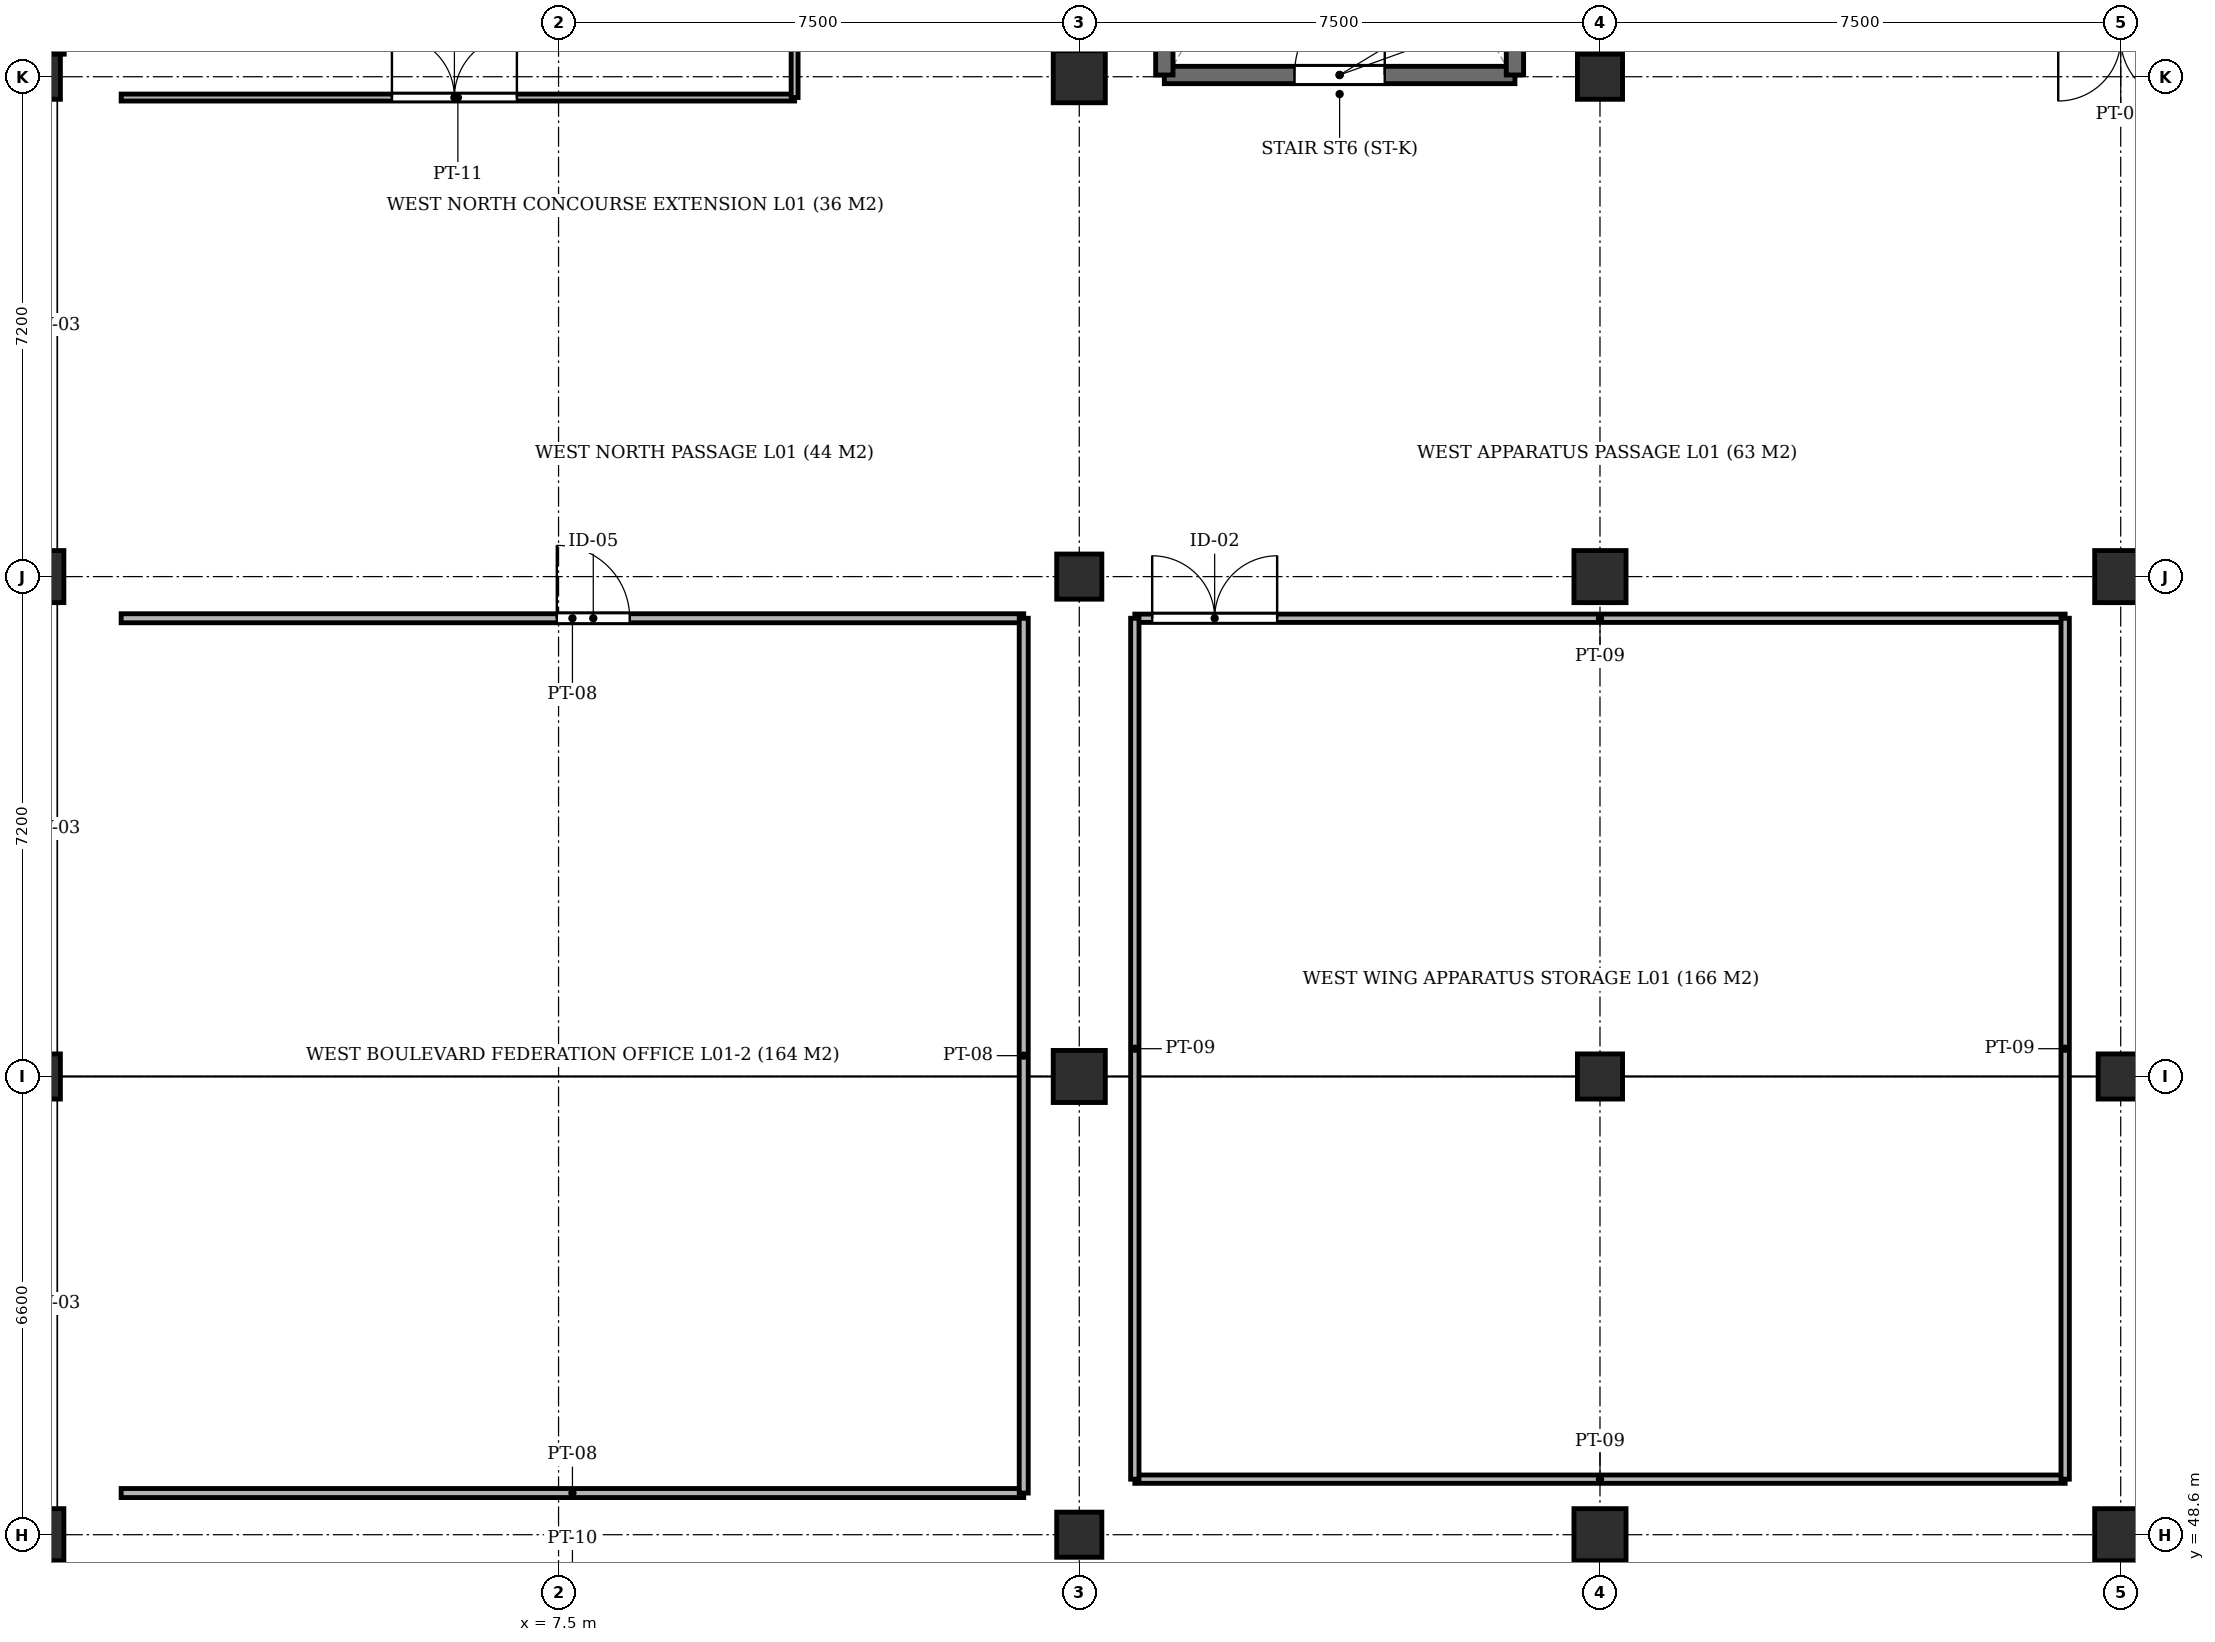
"""IFC4 building model, lengths in metres.
Left out: names, types, materials, properties, quantities, classifications, styles, units other than length and angle.
Written with IfcOpenShell. Run it as: python <this file> out.ifc"""

import sys

from ifc_helpers import new_model, si_unit, direction, frame, frame_2d, origin, origin_2d, place, context, subcontext, project, spatial, rectangle, extrude, element, fill, save


model = new_model("IFC4")
c1 = context("Model", 3, precision=1e-05, world=origin(), true_north=direction((0.0, 1.0)))
c2 = subcontext(c1, "Body", "Model", "MODEL_VIEW")
j1 = project(units=[si_unit("LENGTHUNIT", "METRE"), si_unit("PLANEANGLEUNIT", "RADIAN")], contexts=[c1])
p1 = place(None, origin())
s1 = spatial("IfcSite", under=j1, at=p1, CompositionType="ELEMENT")
p2 = place(p1, origin())
s2 = spatial("IfcBuilding", under=s1, at=p2, CompositionType="ELEMENT")
p3 = place(p2, frame((0.0, 0.0, 4.6)))
s3 = spatial("IfcBuildingStorey", under=s2, at=p3, CompositionType="ELEMENT", Elevation=4.6)
p4 = place(p3, frame((0.0, 48.6, -0.3), z_axis=(0.0, 0.0, 1.0), x_axis=(1.0, 0.0, 0.0)))
e1 = element("IfcColumn", 1, at=p4, inside=s3, PredefinedType="COLUMN", context=c2, shape_type="SweptSolid", body=[
    extrude(rectangle(XDim=0.75, YDim=0.75, at=origin_2d()), origin(), (0.0, 0.0, 1.0), 4.65),
])
p5 = place(p3, frame((0.0, 55.2, -0.3), z_axis=(0.0, 0.0, 1.0), x_axis=(1.0, 0.0, 0.0)))
e2 = element("IfcColumn", 2, at=p5, inside=s3, PredefinedType="COLUMN", context=c2, shape_type="SweptSolid", body=[
    extrude(rectangle(XDim=0.65, YDim=0.65, at=origin_2d()), origin(), (0.0, 0.0, 1.0), 4.65),
])
p6 = place(p3, frame((0.0, 62.4, -0.3), z_axis=(0.0, 0.0, 1.0), x_axis=(1.0, 0.0, 0.0)))
e3 = element("IfcColumn", 3, at=p6, inside=s3, PredefinedType="COLUMN", context=c2, shape_type="SweptSolid", body=[
    extrude(rectangle(XDim=0.75, YDim=0.75, at=origin_2d()), origin(), (0.0, 0.0, 1.0), 4.65),
])
for number, where, z_axis, x_axis in (
    (4, (0.0, 69.6, -0.3), (0.0, 0.0, 1.0), (1.0, 0.0, 0.0)),
    (5, (15.0, 48.6, -0.3), (0.0, 0.0, 1.0), (1.0, 0.0, 0.0)),
):
    element("IfcColumn", number, at=place(p3, frame(where, z_axis=z_axis, x_axis=x_axis)), inside=s3, PredefinedType="COLUMN", context=c2, shape_type="SweptSolid", body=[
        extrude(rectangle(XDim=0.65, YDim=0.65, at=origin_2d()), origin(), (0.0, 0.0, 1.0), 4.65),
    ])
p7 = place(p3, frame((15.0, 55.2, -0.3), z_axis=(0.0, 0.0, 1.0), x_axis=(1.0, 0.0, 0.0)))
e6 = element("IfcColumn", 6, at=p7, inside=s3, PredefinedType="COLUMN", context=c2, shape_type="SweptSolid", body=[
    extrude(rectangle(XDim=0.75, YDim=0.75, at=origin_2d()), origin(), (0.0, 0.0, 1.0), 4.65),
])
p8 = place(p3, frame((15.0, 62.4, -0.3), z_axis=(0.0, 0.0, 1.0), x_axis=(1.0, 0.0, 0.0)))
e7 = element("IfcColumn", 7, at=p8, inside=s3, PredefinedType="COLUMN", context=c2, shape_type="SweptSolid", body=[
    extrude(rectangle(XDim=0.65, YDim=0.65, at=origin_2d()), origin(), (0.0, 0.0, 1.0), 4.65),
])
for number, where, z_axis, x_axis in (
    (8, (15.0, 69.6, -0.3), (0.0, 0.0, 1.0), (1.0, 0.0, 0.0)),
    (9, (22.5, 48.6, -0.3), (0.0, 0.0, 1.0), (1.0, 0.0, 0.0)),
):
    element("IfcColumn", number, at=place(p3, frame(where, z_axis=z_axis, x_axis=x_axis)), inside=s3, PredefinedType="COLUMN", context=c2, shape_type="SweptSolid", body=[
        extrude(rectangle(XDim=0.75, YDim=0.75, at=origin_2d()), origin(), (0.0, 0.0, 1.0), 4.65),
    ])
p9 = place(p3, frame((22.5, 55.2, -0.3), z_axis=(0.0, 0.0, 1.0), x_axis=(1.0, 0.0, 0.0)))
e10 = element("IfcColumn", 10, at=p9, inside=s3, PredefinedType="COLUMN", context=c2, shape_type="SweptSolid", body=[
    extrude(rectangle(XDim=0.65, YDim=0.65, at=origin_2d()), origin(), (0.0, 0.0, 1.0), 4.65),
])
p10 = place(p3, frame((22.5, 62.4, -0.3), z_axis=(0.0, 0.0, 1.0), x_axis=(1.0, 0.0, 0.0)))
e11 = element("IfcColumn", 11, at=p10, inside=s3, PredefinedType="COLUMN", context=c2, shape_type="SweptSolid", body=[
    extrude(rectangle(XDim=0.75, YDim=0.75, at=origin_2d()), origin(), (0.0, 0.0, 1.0), 4.65),
])
p11 = place(p3, frame((22.5, 69.6, -0.3), z_axis=(0.0, 0.0, 1.0), x_axis=(1.0, 0.0, 0.0)))
e12 = element("IfcColumn", 12, at=p11, inside=s3, PredefinedType="COLUMN", context=c2, shape_type="SweptSolid", body=[
    extrude(rectangle(XDim=0.65, YDim=0.65, at=origin_2d()), origin(), (0.0, 0.0, 1.0), 4.65),
])
p12 = place(p3, frame((30.0, 48.6, -0.3), z_axis=(0.0, 0.0, 1.0), x_axis=(1.0, 0.0, 0.0)))
e13 = element("IfcColumn", 13, at=p12, inside=s3, PredefinedType="COLUMN", context=c2, shape_type="SweptSolid", body=[
    extrude(rectangle(XDim=0.75, YDim=0.75, at=origin_2d()), origin(), (0.0, 0.0, 1.0), 4.65),
])
p13 = place(p3, frame((30.0, 55.2, -0.3), z_axis=(0.0, 0.0, 1.0), x_axis=(1.0, 0.0, 0.0)))
e14 = element("IfcColumn", 14, at=p13, inside=s3, PredefinedType="COLUMN", context=c2, shape_type="SweptSolid", body=[
    extrude(rectangle(XDim=0.65, YDim=0.65, at=origin_2d()), origin(), (0.0, 0.0, 1.0), 4.65),
])
p14 = place(p3, frame((30.0, 62.4, -0.3), z_axis=(0.0, 0.0, 1.0), x_axis=(1.0, 0.0, 0.0)))
e15 = element("IfcColumn", 15, at=p14, inside=s3, PredefinedType="COLUMN", context=c2, shape_type="SweptSolid", body=[
    extrude(rectangle(XDim=0.75, YDim=0.75, at=origin_2d()), origin(), (0.0, 0.0, 1.0), 4.65),
])
p15 = place(p3, frame((0.19, 76.8, 0.0), z_axis=(0.0, 0.0, 1.0), x_axis=(0.0, -1.0, 0.0)))
e16 = element("IfcWall", 16, at=p15, inside=s3, PredefinedType="SOLIDWALL", context=c2, shape_type="SweptSolid", body=[
    extrude(rectangle(XDim=6.875, YDim=0.38, at=frame_2d((3.438, 0.0))), origin(), (0.0, 0.0, 1.0), 3.65),
])
p16 = place(p15, frame((3.881, 0.0, 0.92)))
e17 = element("IfcOpeningElement", 17, at=p16, cuts=e16, PredefinedType="OPENING", context=c2, shape_type="SweptSolid", body=[
    extrude(rectangle(XDim=2.0, YDim=2.3, at=frame_2d((1.0, 1.15))), frame((0.0, 0.202, 0.0), z_axis=(0.0, -1.0, 0.0), x_axis=(1.0, 0.0, 0.0)), (0.0, 0.0, 1.0), 0.404),
])
p17 = place(p15, frame((0.994, 0.0, 0.92)))
e18 = element("IfcOpeningElement", 18, at=p17, cuts=e16, PredefinedType="OPENING", context=c2, shape_type="SweptSolid", body=[
    extrude(rectangle(XDim=2.0, YDim=2.3, at=frame_2d((1.0, 1.15))), frame((0.0, 0.202, 0.0), z_axis=(0.0, -1.0, 0.0), x_axis=(1.0, 0.0, 0.0)), (0.0, 0.0, 1.0), 0.404),
])
p18 = place(p3, frame((16.225, 69.625, 0.0), z_axis=(0.0, 0.0, 1.0), x_axis=(1.0, 0.0, 0.0)))
e19 = element("IfcWall", 19, at=p18, inside=s3, PredefinedType="SHEAR", context=c2, shape_type="SweptSolid", body=[
    extrude(rectangle(XDim=5.05, YDim=0.25, at=frame_2d((2.525, 0.0))), origin(), (0.0, 0.0, 1.0), 4.48),
])
p19 = place(p18, frame((1.875, 0.0, 0.0)))
e20 = element("IfcOpeningElement", 20, at=p19, cuts=e19, PredefinedType="OPENING", context=c2, shape_type="SweptSolid", body=[
    extrude(rectangle(XDim=1.3, YDim=2.2, at=frame_2d((0.65, 1.1))), frame((0.0, 0.137, 0.0), z_axis=(0.0, -1.0, 0.0), x_axis=(1.0, 0.0, 0.0)), (0.0, 0.0, 1.0), 0.274),
])
for number, where, z_axis, x_axis in (
    (21, (16.225, 78.325, 0.0), (0.0, 0.0, 1.0), (0.0, -1.0, 0.0)),
    (22, (21.275, 69.625, 0.0), (0.0, 0.0, 1.0), (0.0, 1.0, 0.0)),
):
    element("IfcWall", number, at=place(p3, frame(where, z_axis=z_axis, x_axis=x_axis)), inside=s3, PredefinedType="SHEAR", context=c2, shape_type="SweptSolid", body=[
        extrude(rectangle(XDim=8.7, YDim=0.25, at=frame_2d((4.35, 0.0))), origin(), (0.0, 0.0, 1.0), 4.48),
    ])
p20 = place(p3, frame((1.2, 49.2, 0.0), z_axis=(0.0, 0.0, 1.0), x_axis=(1.0, 0.0, 0.0)))
e23 = element("IfcWall", 23, at=p20, inside=s3, PredefinedType="PARTITIONING", context=c2, shape_type="SweptSolid", body=[
    extrude(rectangle(XDim=13.0, YDim=0.13, at=frame_2d((6.5, 0.0))), origin(), (0.0, 0.0, 1.0), 4.08),
])
p21 = place(p3, frame((1.2, 61.8, 0.0), z_axis=(0.0, 0.0, 1.0), x_axis=(1.0, 0.0, 0.0)))
e24 = element("IfcWall", 24, at=p21, inside=s3, PredefinedType="PARTITIONING", context=c2, shape_type="SweptSolid", body=[
    extrude(rectangle(XDim=13.0, YDim=0.13, at=frame_2d((6.5, 0.0))), origin(), (0.0, 0.0, 1.0), 4.08),
])
p22 = place(p21, frame((6.275, 0.0, 0.0)))
e25 = element("IfcOpeningElement", 25, at=p22, cuts=e24, PredefinedType="OPENING", context=c2, shape_type="SweptSolid", body=[
    extrude(rectangle(XDim=1.05, YDim=2.15, at=frame_2d((0.525, 1.075))), frame((0.0, 0.077, 0.0), z_axis=(0.0, -1.0, 0.0), x_axis=(1.0, 0.0, 0.0)), (0.0, 0.0, 1.0), 0.154),
])
p23 = place(p3, frame((14.2, 49.2, 0.0), z_axis=(0.0, 0.0, 1.0), x_axis=(0.0, 1.0, 0.0)))
e26 = element("IfcWall", 26, at=p23, inside=s3, PredefinedType="PARTITIONING", context=c2, shape_type="SweptSolid", body=[
    extrude(rectangle(XDim=12.6, YDim=0.13, at=frame_2d((6.3, 0.0))), origin(), (0.0, 0.0, 1.0), 4.08),
])
p24 = place(p3, frame((1.2, 69.3, 0.0), z_axis=(0.0, 0.0, 1.0), x_axis=(1.0, 0.0, 0.0)))
e27 = element("IfcWall", 27, at=p24, inside=s3, PredefinedType="PARTITIONING", context=c2, shape_type="SweptSolid", body=[
    extrude(rectangle(XDim=9.7, YDim=0.1, at=frame_2d((4.85, 0.0))), origin(), (0.0, 0.0, 1.0), 3.35),
])
p25 = place(p24, frame((3.9, 0.0, 0.0)))
e28 = element("IfcOpeningElement", 28, at=p25, cuts=e27, PredefinedType="OPENING", context=c2, shape_type="SweptSolid", body=[
    extrude(rectangle(XDim=1.8, YDim=2.25, at=frame_2d((0.9, 1.125))), frame((0.0, 0.062, 0.0), z_axis=(0.0, -1.0, 0.0), x_axis=(1.0, 0.0, 0.0)), (0.0, 0.0, 1.0), 0.124),
])
p26 = place(p3, frame((10.9, 69.3, 0.0), z_axis=(0.0, 0.0, 1.0), x_axis=(0.0, 1.0, 0.0)))
e29 = element("IfcWall", 29, at=p26, inside=s3, PredefinedType="PARTITIONING", context=c2, shape_type="SweptSolid", body=[
    extrude(rectangle(XDim=11.1, YDim=0.1, at=frame_2d((5.55, 0.0))), origin(), (0.0, 0.0, 1.0), 4.08),
])
p27 = place(p3, frame((15.8, 49.4, 0.0), z_axis=(0.0, 0.0, 1.0), x_axis=(1.0, 0.0, 0.0)))
e30 = element("IfcWall", 30, at=p27, inside=s3, PredefinedType="PARTITIONING", context=c2, shape_type="SweptSolid", body=[
    extrude(rectangle(XDim=13.4, YDim=0.12, at=frame_2d((6.7, 0.0))), origin(), (0.0, 0.0, 1.0), 4.08),
])
p28 = place(p3, frame((15.8, 61.8, 0.0), z_axis=(0.0, 0.0, 1.0), x_axis=(1.0, 0.0, 0.0)))
e31 = element("IfcWall", 31, at=p28, inside=s3, PredefinedType="PARTITIONING", context=c2, shape_type="SweptSolid", body=[
    extrude(rectangle(XDim=13.4, YDim=0.12, at=frame_2d((6.7, 0.0))), origin(), (0.0, 0.0, 1.0), 4.08),
])
p29 = place(p28, frame((0.25, 0.0, 0.0)))
e32 = element("IfcOpeningElement", 32, at=p29, cuts=e31, PredefinedType="OPENING", context=c2, shape_type="SweptSolid", body=[
    extrude(rectangle(XDim=1.8, YDim=2.25, at=frame_2d((0.9, 1.125))), frame((0.0, 0.072, 0.0), z_axis=(0.0, -1.0, 0.0), x_axis=(1.0, 0.0, 0.0)), (0.0, 0.0, 1.0), 0.144),
])
for number, where, z_axis, x_axis in (
    (33, (15.8, 49.4, 0.0), (0.0, 0.0, 1.0), (0.0, 1.0, 0.0)),
    (34, (29.2, 49.4, 0.0), (0.0, 0.0, 1.0), (0.0, 1.0, 0.0)),
):
    element("IfcWall", number, at=place(p3, frame(where, z_axis=z_axis, x_axis=x_axis)), inside=s3, PredefinedType="PARTITIONING", context=c2, shape_type="SweptSolid", body=[
        extrude(rectangle(XDim=12.4, YDim=0.12, at=frame_2d((6.2, 0.0))), origin(), (0.0, 0.0, 1.0), 4.08),
    ])
p30 = place(p19, origin())
e35 = element("IfcDoor", 35, at=p30, inside=s3, OperationType="SINGLE_SWING_RIGHT", PredefinedType="DOOR", context=c2, shape_type="SweptSolid", body=[
    extrude(rectangle(XDim=1.3, YDim=2.2, at=frame_2d((0.65, 1.1))), frame((0.0, 0.025, 0.0), z_axis=(0.0, -1.0, 0.0), x_axis=(1.0, 0.0, 0.0)), (0.0, 0.0, 1.0), 0.05),
])
fill(e20, e35)
p31 = place(p22, origin())
e36 = element("IfcDoor", 36, at=p31, inside=s3, OperationType="SINGLE_SWING_LEFT", PredefinedType="DOOR", context=c2, shape_type="SweptSolid", body=[
    extrude(rectangle(XDim=1.05, YDim=2.15, at=frame_2d((0.525, 1.075))), frame((0.0, 0.025, 0.0), z_axis=(0.0, -1.0, 0.0), x_axis=(1.0, 0.0, 0.0)), (0.0, 0.0, 1.0), 0.05),
])
fill(e25, e36)
p32 = place(p25, origin())
e37 = element("IfcDoor", 37, at=p32, inside=s3, OperationType="DOUBLE_DOOR_SINGLE_SWING", PredefinedType="DOOR", context=c2, shape_type="SweptSolid", body=[
    extrude(rectangle(XDim=1.8, YDim=2.25, at=frame_2d((0.9, 1.125))), frame((0.0, 0.025, 0.0), z_axis=(0.0, -1.0, 0.0), x_axis=(1.0, 0.0, 0.0)), (0.0, 0.0, 1.0), 0.05),
])
fill(e28, e37)
p33 = place(p29, origin())
e38 = element("IfcDoor", 38, at=p33, inside=s3, OperationType="DOUBLE_DOOR_SINGLE_SWING", PredefinedType="DOOR", context=c2, shape_type="SweptSolid", body=[
    extrude(rectangle(XDim=1.8, YDim=2.25, at=frame_2d((0.9, 1.125))), frame((0.0, 0.025, 0.0), z_axis=(0.0, -1.0, 0.0), x_axis=(1.0, 0.0, 0.0)), (0.0, 0.0, 1.0), 0.05),
])
fill(e32, e38)
save(model, sys.argv[1])
